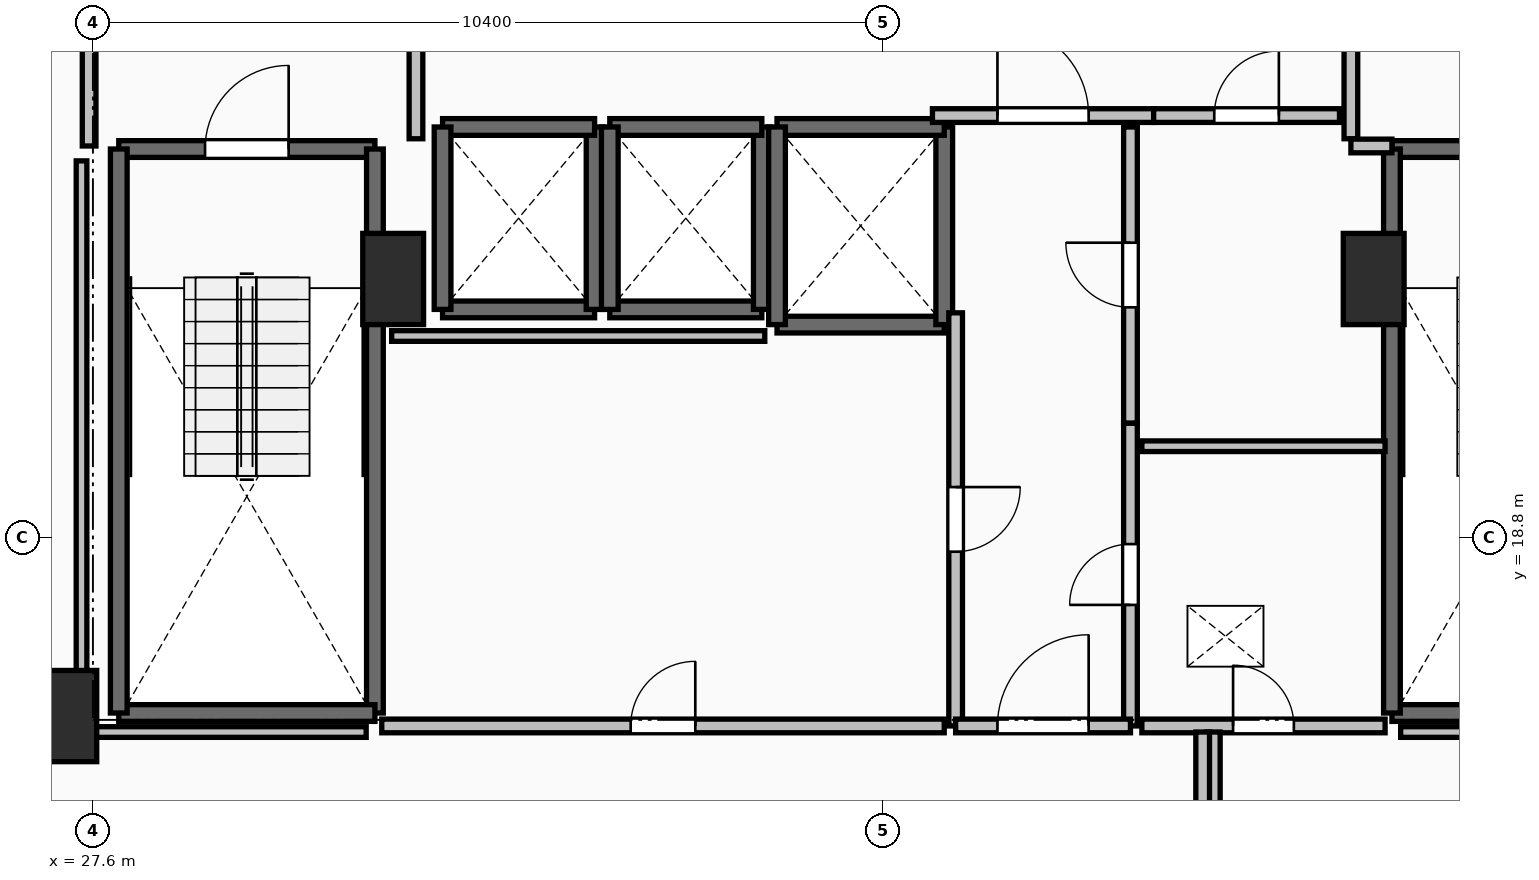
"""IFC4 building model, lengths in metres.
Left out: names, types, materials, properties, quantities, classifications, styles, units other than length and angle.
Written with IfcOpenShell. Run it as: python <this file> out.ifc"""

import sys

from ifc_helpers import new_model, si_unit, direction, frame, frame_2d, origin, origin_2d, place, context, subcontext, project, spatial, rectangle, extrude, element, fill, save


model = new_model("IFC4")
c1 = context("Model", 3, precision=1e-05, world=origin(), true_north=direction((0.0, 1.0)))
c2 = subcontext(c1, "Body", "Model", "MODEL_VIEW")
j1 = project(units=[si_unit("LENGTHUNIT", "METRE"), si_unit("PLANEANGLEUNIT", "RADIAN")], contexts=[c1])
p1 = place(None, origin())
s1 = spatial("IfcSite", under=j1, at=p1, CompositionType="ELEMENT")
p2 = place(p1, origin())
s2 = spatial("IfcBuilding", under=s1, at=p2, CompositionType="ELEMENT")
p3 = place(p2, frame((0.0, 0.0, 62.5)))
s3 = spatial("IfcBuildingStorey", under=s2, at=p3, CompositionType="ELEMENT", Elevation=62.5)
for number, where, z_axis, x_axis in (
    (1, (27.25, 16.45, 0.0), (0.0, 0.0, 1.0), (1.0, 0.0, 0.0)),
    (2, (31.55, 22.2, 0.0), (0.0, 0.0, 1.0), (1.0, 0.0, 0.0)),
    (3, (44.45, 22.2, 0.0), (0.0, 0.0, 1.0), (1.0, 0.0, 0.0)),
):
    element("IfcColumn", number, at=place(p3, frame(where, z_axis=z_axis, x_axis=x_axis)), inside=s3, PredefinedType="PILASTER", context=c2, shape_type="SweptSolid", body=[
        extrude(rectangle(XDim=0.8, YDim=1.2, at=origin_2d()), origin(), (0.0, 0.0, 1.0), 3.5),
    ])
p4 = place(p3, frame((27.94, 23.91, 0.0), z_axis=(0.0, 0.0, 1.0), x_axis=(1.0, 0.0, 0.0)))
e4 = element("IfcWall", 4, at=p4, inside=s3, PredefinedType="SOLIDWALL", context=c2, shape_type="SweptSolid", body=[
    extrude(rectangle(XDim=3.37, YDim=0.22, at=frame_2d((1.685, 0.0))), origin(), (0.0, 0.0, 1.0), 3.24),
])
p5 = place(p4, frame((1.135, 0.0, 0.0)))
e5 = element("IfcOpeningElement", 5, at=p5, cuts=e4, PredefinedType="OPENING", context=c2, shape_type="SweptSolid", body=[
    extrude(rectangle(XDim=1.1, YDim=2.15, at=frame_2d((0.55, 1.075))), frame((0.0, 0.125, 0.0), z_axis=(0.0, -1.0, 0.0), x_axis=(1.0, 0.0, 0.0)), (0.0, 0.0, 1.0), 0.25),
])
p6 = place(p3, frame((31.31, 23.91, 0.0), z_axis=(0.0, 0.0, 1.0), x_axis=(0.0, -1.0, 0.0)))
e6 = element("IfcWall", 6, at=p6, inside=s3, PredefinedType="SOLIDWALL", context=c2, shape_type="SweptSolid", body=[
    extrude(rectangle(XDim=7.42, YDim=0.22, at=frame_2d((3.71, 0.0))), origin(), (0.0, 0.0, 1.0), 3.24),
])
p7 = place(p3, frame((31.31, 16.49, 0.0), z_axis=(0.0, 0.0, 1.0), x_axis=(-1.0, 0.0, 0.0)))
e7 = element("IfcWall", 7, at=p7, inside=s3, PredefinedType="SOLIDWALL", context=c2, shape_type="SweptSolid", body=[
    extrude(rectangle(XDim=3.37, YDim=0.22, at=frame_2d((1.685, 0.0))), origin(), (0.0, 0.0, 1.0), 3.24),
])
p8 = place(p3, frame((27.94, 16.49, 0.0), z_axis=(0.0, 0.0, 1.0), x_axis=(0.0, 1.0, 0.0)))
e8 = element("IfcWall", 8, at=p8, inside=s3, PredefinedType="SOLIDWALL", context=c2, shape_type="SweptSolid", body=[
    extrude(rectangle(XDim=7.42, YDim=0.22, at=frame_2d((3.71, 0.0))), origin(), (0.0, 0.0, 1.0), 3.24),
])
p9 = place(p3, frame((44.69, 23.91, 0.0), z_axis=(0.0, 0.0, 1.0), x_axis=(1.0, 0.0, 0.0)))
e9 = element("IfcWall", 9, at=p9, inside=s3, PredefinedType="SOLIDWALL", context=c2, shape_type="SweptSolid", body=[
    extrude(rectangle(XDim=3.37, YDim=0.22, at=frame_2d((1.685, 0.0))), origin(), (0.0, 0.0, 1.0), 3.24),
])
p10 = place(p9, frame((1.135, 0.0, 0.0)))
e10 = element("IfcOpeningElement", 10, at=p10, cuts=e9, PredefinedType="OPENING", context=c2, shape_type="SweptSolid", body=[
    extrude(rectangle(XDim=1.1, YDim=2.15, at=frame_2d((0.55, 1.075))), frame((0.0, 0.125, 0.0), z_axis=(0.0, -1.0, 0.0), x_axis=(1.0, 0.0, 0.0)), (0.0, 0.0, 1.0), 0.25),
])
p11 = place(p3, frame((48.06, 16.49, 0.0), z_axis=(0.0, 0.0, 1.0), x_axis=(-1.0, 0.0, 0.0)))
e11 = element("IfcWall", 11, at=p11, inside=s3, PredefinedType="SOLIDWALL", context=c2, shape_type="SweptSolid", body=[
    extrude(rectangle(XDim=3.37, YDim=0.22, at=frame_2d((1.685, 0.0))), origin(), (0.0, 0.0, 1.0), 3.24),
])
p12 = place(p3, frame((44.69, 16.49, 0.0), z_axis=(0.0, 0.0, 1.0), x_axis=(0.0, 1.0, 0.0)))
e12 = element("IfcWall", 12, at=p12, inside=s3, PredefinedType="SOLIDWALL", context=c2, shape_type="SweptSolid", body=[
    extrude(rectangle(XDim=7.42, YDim=0.22, at=frame_2d((3.71, 0.0))), origin(), (0.0, 0.0, 1.0), 3.24),
])
p13 = place(p3, frame((32.2, 21.8, 0.0), z_axis=(0.0, 0.0, 1.0), x_axis=(1.0, 0.0, 0.0)))
e13 = element("IfcWall", 13, at=p13, inside=s3, PredefinedType="SOLIDWALL", context=c2, shape_type="SweptSolid", body=[
    extrude(rectangle(XDim=2.0, YDim=0.22, at=frame_2d((1.0, 0.0))), origin(), (0.0, 0.0, 1.0), 3.24),
])
p14 = place(p3, frame((34.2, 21.8, 0.0), z_axis=(0.0, 0.0, 1.0), x_axis=(0.0, 1.0, 0.0)))
e14 = element("IfcWall", 14, at=p14, inside=s3, PredefinedType="SOLIDWALL", context=c2, shape_type="SweptSolid", body=[
    extrude(rectangle(XDim=2.4, YDim=0.22, at=frame_2d((1.2, 0.0))), origin(), (0.0, 0.0, 1.0), 3.24),
])
p15 = place(p3, frame((34.2, 24.2, 0.0), z_axis=(0.0, 0.0, 1.0), x_axis=(-1.0, 0.0, 0.0)))
e15 = element("IfcWall", 15, at=p15, inside=s3, PredefinedType="SOLIDWALL", context=c2, shape_type="SweptSolid", body=[
    extrude(rectangle(XDim=2.0, YDim=0.22, at=frame_2d((1.0, 0.0))), origin(), (0.0, 0.0, 1.0), 3.24),
])
p16 = place(p3, frame((32.2, 24.2, 0.0), z_axis=(0.0, 0.0, 1.0), x_axis=(0.0, -1.0, 0.0)))
e16 = element("IfcWall", 16, at=p16, inside=s3, PredefinedType="SOLIDWALL", context=c2, shape_type="SweptSolid", body=[
    extrude(rectangle(XDim=2.4, YDim=0.22, at=frame_2d((1.2, 0.0))), origin(), (0.0, 0.0, 1.0), 3.24),
])
p17 = place(p3, frame((34.4, 21.8, 0.0), z_axis=(0.0, 0.0, 1.0), x_axis=(1.0, 0.0, 0.0)))
e17 = element("IfcWall", 17, at=p17, inside=s3, PredefinedType="SOLIDWALL", context=c2, shape_type="SweptSolid", body=[
    extrude(rectangle(XDim=2.0, YDim=0.22, at=frame_2d((1.0, 0.0))), origin(), (0.0, 0.0, 1.0), 3.24),
])
p18 = place(p3, frame((36.4, 21.8, 0.0), z_axis=(0.0, 0.0, 1.0), x_axis=(0.0, 1.0, 0.0)))
e18 = element("IfcWall", 18, at=p18, inside=s3, PredefinedType="SOLIDWALL", context=c2, shape_type="SweptSolid", body=[
    extrude(rectangle(XDim=2.4, YDim=0.22, at=frame_2d((1.2, 0.0))), origin(), (0.0, 0.0, 1.0), 3.24),
])
p19 = place(p3, frame((36.4, 24.2, 0.0), z_axis=(0.0, 0.0, 1.0), x_axis=(-1.0, 0.0, 0.0)))
e19 = element("IfcWall", 19, at=p19, inside=s3, PredefinedType="SOLIDWALL", context=c2, shape_type="SweptSolid", body=[
    extrude(rectangle(XDim=2.0, YDim=0.22, at=frame_2d((1.0, 0.0))), origin(), (0.0, 0.0, 1.0), 3.24),
])
p20 = place(p3, frame((34.4, 24.2, 0.0), z_axis=(0.0, 0.0, 1.0), x_axis=(0.0, -1.0, 0.0)))
e20 = element("IfcWall", 20, at=p20, inside=s3, PredefinedType="SOLIDWALL", context=c2, shape_type="SweptSolid", body=[
    extrude(rectangle(XDim=2.4, YDim=0.22, at=frame_2d((1.2, 0.0))), origin(), (0.0, 0.0, 1.0), 3.24),
])
p21 = place(p3, frame((36.6, 21.6, 0.0), z_axis=(0.0, 0.0, 1.0), x_axis=(1.0, 0.0, 0.0)))
e21 = element("IfcWall", 21, at=p21, inside=s3, PredefinedType="SOLIDWALL", context=c2, shape_type="SweptSolid", body=[
    extrude(rectangle(XDim=2.2, YDim=0.22, at=frame_2d((1.1, 0.0))), origin(), (0.0, 0.0, 1.0), 3.24),
])
p22 = place(p3, frame((38.8, 21.6, 0.0), z_axis=(0.0, 0.0, 1.0), x_axis=(0.0, 1.0, 0.0)))
e22 = element("IfcWall", 22, at=p22, inside=s3, PredefinedType="SOLIDWALL", context=c2, shape_type="SweptSolid", body=[
    extrude(rectangle(XDim=2.6, YDim=0.22, at=frame_2d((1.3, 0.0))), origin(), (0.0, 0.0, 1.0), 3.24),
])
p23 = place(p3, frame((38.8, 24.2, 0.0), z_axis=(0.0, 0.0, 1.0), x_axis=(-1.0, 0.0, 0.0)))
e23 = element("IfcWall", 23, at=p23, inside=s3, PredefinedType="SOLIDWALL", context=c2, shape_type="SweptSolid", body=[
    extrude(rectangle(XDim=2.2, YDim=0.22, at=frame_2d((1.1, 0.0))), origin(), (0.0, 0.0, 1.0), 3.24),
])
p24 = place(p3, frame((36.6, 24.2, 0.0), z_axis=(0.0, 0.0, 1.0), x_axis=(0.0, -1.0, 0.0)))
e24 = element("IfcWall", 24, at=p24, inside=s3, PredefinedType="SOLIDWALL", context=c2, shape_type="SweptSolid", body=[
    extrude(rectangle(XDim=2.6, YDim=0.22, at=frame_2d((1.3, 0.0))), origin(), (0.0, 0.0, 1.0), 3.24),
])
p25 = place(p3, frame((31.85, 24.045, 0.0), z_axis=(0.0, 0.0, 1.0), x_axis=(0.0, 1.0, 0.0)))
e25 = element("IfcWall", 25, at=p25, inside=s3, PredefinedType="PARTITIONING", context=c2, shape_type="SweptSolid", body=[
    extrude(rectangle(XDim=3.91, YDim=0.18, at=frame_2d((1.955, 0.0))), origin(), (0.0, 0.0, 1.0), 3.24),
])
p26 = place(p25, frame((1.355, 0.0, 0.0)))
e26 = element("IfcOpeningElement", 26, at=p26, cuts=e25, PredefinedType="OPENING", context=c2, shape_type="SweptSolid", body=[
    extrude(rectangle(XDim=1.2, YDim=2.15, at=frame_2d((0.6, 1.075))), frame((0.0, 0.105, 0.0), z_axis=(0.0, -1.0, 0.0), x_axis=(1.0, 0.0, 0.0)), (0.0, 0.0, 1.0), 0.21),
])
p27 = place(p3, frame((27.55, 28.0, 0.0), z_axis=(0.0, 0.0, 1.0), x_axis=(0.0, -1.0, 0.0)))
e27 = element("IfcWall", 27, at=p27, inside=s3, PredefinedType="PARTITIONING", context=c2, shape_type="SweptSolid", body=[
    extrude(rectangle(XDim=4.05, YDim=0.18, at=frame_2d((2.025, 0.0))), origin(), (0.0, 0.0, 1.0), 3.24),
])
p28 = place(p27, frame((1.425, 0.0, 0.0)))
e28 = element("IfcOpeningElement", 28, at=p28, cuts=e27, PredefinedType="OPENING", context=c2, shape_type="SweptSolid", body=[
    extrude(rectangle(XDim=1.2, YDim=2.15, at=frame_2d((0.6, 1.075))), frame((0.0, 0.105, 0.0), z_axis=(0.0, -1.0, 0.0), x_axis=(1.0, 0.0, 0.0)), (0.0, 0.0, 1.0), 0.21),
])
p29 = place(p3, frame((44.15, 27.955, 0.0), z_axis=(0.0, 0.0, 1.0), x_axis=(0.0, -1.0, 0.0)))
e29 = element("IfcWall", 29, at=p29, inside=s3, PredefinedType="PARTITIONING", context=c2, shape_type="SweptSolid", body=[
    extrude(rectangle(XDim=3.91, YDim=0.18, at=frame_2d((1.955, 0.0))), origin(), (0.0, 0.0, 1.0), 3.24),
])
p30 = place(p29, frame((1.355, 0.0, 0.0)))
e30 = element("IfcOpeningElement", 30, at=p30, cuts=e29, PredefinedType="OPENING", context=c2, shape_type="SweptSolid", body=[
    extrude(rectangle(XDim=1.2, YDim=2.15, at=frame_2d((0.6, 1.075))), frame((0.0, 0.105, 0.0), z_axis=(0.0, -1.0, 0.0), x_axis=(1.0, 0.0, 0.0)), (0.0, 0.0, 1.0), 0.21),
])
p31 = place(p3, frame((44.15, 23.95, 0.0), z_axis=(0.0, 0.0, 1.0), x_axis=(1.0, 0.0, 0.0)))
e31 = element("IfcWall", 31, at=p31, inside=s3, PredefinedType="PARTITIONING", context=c2, shape_type="SweptSolid", body=[
    extrude(rectangle(XDim=0.54, YDim=0.18, at=frame_2d((0.27, 0.0))), origin(), (0.0, 0.0, 1.0), 3.24),
])
p32 = place(p3, frame((38.645, 24.35, 0.0), z_axis=(0.0, 0.0, 1.0), x_axis=(1.0, 0.0, 0.0)))
e32 = element("IfcWall", 32, at=p32, inside=s3, PredefinedType="PARTITIONING", context=c2, shape_type="SweptSolid", body=[
    extrude(rectangle(XDim=2.91, YDim=0.18, at=frame_2d((1.455, 0.0))), origin(), (0.0, 0.0, 1.0), 3.24),
])
p33 = place(p32, frame((0.855, 0.0, 0.0)))
e33 = element("IfcOpeningElement", 33, at=p33, cuts=e32, PredefinedType="OPENING", context=c2, shape_type="SweptSolid", body=[
    extrude(rectangle(XDim=1.2, YDim=2.15, at=frame_2d((0.6, 1.075))), frame((0.0, 0.105, 0.0), z_axis=(0.0, -1.0, 0.0), x_axis=(1.0, 0.0, 0.0)), (0.0, 0.0, 1.0), 0.21),
])
p34 = place(p3, frame((41.555, 24.35, 0.0), z_axis=(0.0, 0.0, 1.0), x_axis=(1.0, 0.0, 0.0)))
e34 = element("IfcWall", 34, at=p34, inside=s3, PredefinedType="PARTITIONING", context=c2, shape_type="SweptSolid", body=[
    extrude(rectangle(XDim=2.445, YDim=0.18, at=frame_2d((1.223, 0.0))), origin(), (0.0, 0.0, 1.0), 3.24),
])
p35 = place(p34, frame((0.798, 0.0, 0.0)))
e35 = element("IfcOpeningElement", 35, at=p35, cuts=e34, PredefinedType="OPENING", context=c2, shape_type="SweptSolid", body=[
    extrude(rectangle(XDim=0.85, YDim=2.1, at=frame_2d((0.425, 1.05))), frame((0.0, 0.105, 0.0), z_axis=(0.0, -1.0, 0.0), x_axis=(1.0, 0.0, 0.0)), (0.0, 0.0, 1.0), 0.21),
])
p36 = place(p3, frame((41.25, 16.32, 0.0), z_axis=(0.0, 0.0, 1.0), x_axis=(0.0, 1.0, 0.0)))
e36 = element("IfcWall", 36, at=p36, inside=s3, PredefinedType="PARTITIONING", context=c2, shape_type="SweptSolid", body=[
    extrude(rectangle(XDim=3.985, YDim=0.18, at=frame_2d((1.992, 0.0))), origin(), (0.0, 0.0, 1.0), 3.24),
])
p37 = place(p36, frame((1.593, 0.0, 0.0)))
e37 = element("IfcOpeningElement", 37, at=p37, cuts=e36, PredefinedType="OPENING", context=c2, shape_type="SweptSolid", body=[
    extrude(rectangle(XDim=0.8, YDim=2.05, at=frame_2d((0.4, 1.025))), frame((0.0, 0.105, 0.0), z_axis=(0.0, -1.0, 0.0), x_axis=(1.0, 0.0, 0.0)), (0.0, 0.0, 1.0), 0.21),
])
p38 = place(p3, frame((41.25, 20.305, 0.0), z_axis=(0.0, 0.0, 1.0), x_axis=(0.0, 1.0, 0.0)))
e38 = element("IfcWall", 38, at=p38, inside=s3, PredefinedType="PARTITIONING", context=c2, shape_type="SweptSolid", body=[
    extrude(rectangle(XDim=3.895, YDim=0.18, at=frame_2d((1.948, 0.0))), origin(), (0.0, 0.0, 1.0), 3.24),
])
p39 = place(p38, frame((1.522, 0.0, 0.0)))
e39 = element("IfcOpeningElement", 39, at=p39, cuts=e38, PredefinedType="OPENING", context=c2, shape_type="SweptSolid", body=[
    extrude(rectangle(XDim=0.85, YDim=2.1, at=frame_2d((0.425, 1.05))), frame((0.0, 0.105, 0.0), z_axis=(0.0, -1.0, 0.0), x_axis=(1.0, 0.0, 0.0)), (0.0, 0.0, 1.0), 0.21),
])
p40 = place(p3, frame((38.95, 21.755, 0.0), z_axis=(0.0, 0.0, 1.0), x_axis=(0.0, -1.0, 0.0)))
e40 = element("IfcWall", 40, at=p40, inside=s3, PredefinedType="PARTITIONING", context=c2, shape_type="SweptSolid", body=[
    extrude(rectangle(XDim=5.435, YDim=0.18, at=frame_2d((2.717, 0.0))), origin(), (0.0, 0.0, 1.0), 3.24),
])
p41 = place(p40, frame((2.292, 0.0, 0.0)))
e41 = element("IfcOpeningElement", 41, at=p41, cuts=e40, PredefinedType="OPENING", context=c2, shape_type="SweptSolid", body=[
    extrude(rectangle(XDim=0.85, YDim=2.1, at=frame_2d((0.425, 1.05))), frame((0.0, 0.105, 0.0), z_axis=(0.0, -1.0, 0.0), x_axis=(1.0, 0.0, 0.0)), (0.0, 0.0, 1.0), 0.21),
])
p42 = place(p3, frame((38.95, 16.32, 0.0), z_axis=(0.0, 0.0, 1.0), x_axis=(1.0, 0.0, 0.0)))
e42 = element("IfcWall", 42, at=p42, inside=s3, PredefinedType="PARTITIONING", context=c2, shape_type="SweptSolid", body=[
    extrude(rectangle(XDim=2.3, YDim=0.18, at=frame_2d((1.15, 0.0))), origin(), (0.0, 0.0, 1.0), 3.24),
])
p43 = place(p42, frame((0.55, 0.0, 0.0)))
e43 = element("IfcOpeningElement", 43, at=p43, cuts=e42, PredefinedType="OPENING", context=c2, shape_type="SweptSolid", body=[
    extrude(rectangle(XDim=1.2, YDim=2.15, at=frame_2d((0.6, 1.075))), frame((0.0, 0.105, 0.0), z_axis=(0.0, -1.0, 0.0), x_axis=(1.0, 0.0, 0.0)), (0.0, 0.0, 1.0), 0.21),
])
p44 = place(p3, frame((44.6, 20.0, 0.0), z_axis=(0.0, 0.0, 1.0), x_axis=(-1.0, 0.0, 0.0)))
e44 = element("IfcWall", 44, at=p44, inside=s3, PredefinedType="PARTITIONING", context=c2, shape_type="SweptSolid", body=[
    extrude(rectangle(XDim=3.2, YDim=0.14, at=frame_2d((1.6, 0.0))), origin(), (0.0, 0.0, 1.0), 3.24),
])
p45 = place(p3, frame((41.4, 16.32, 0.0), z_axis=(0.0, 0.0, 1.0), x_axis=(1.0, 0.0, 0.0)))
e45 = element("IfcWall", 45, at=p45, inside=s3, PredefinedType="PARTITIONING", context=c2, shape_type="SweptSolid", body=[
    extrude(rectangle(XDim=3.2, YDim=0.18, at=frame_2d((1.6, 0.0))), origin(), (0.0, 0.0, 1.0), 3.24),
])
p46 = place(p45, frame((1.2, 0.0, 0.0)))
e46 = element("IfcOpeningElement", 46, at=p46, cuts=e45, PredefinedType="OPENING", context=c2, shape_type="SweptSolid", body=[
    extrude(rectangle(XDim=0.8, YDim=2.05, at=frame_2d((0.4, 1.025))), frame((0.0, 0.105, 0.0), z_axis=(0.0, -1.0, 0.0), x_axis=(1.0, 0.0, 0.0)), (0.0, 0.0, 1.0), 0.21),
])
p47 = place(p3, frame((31.4, 16.32, 0.0), z_axis=(0.0, 0.0, 1.0), x_axis=(1.0, 0.0, 0.0)))
e47 = element("IfcWall", 47, at=p47, inside=s3, PredefinedType="PARTITIONING", context=c2, shape_type="SweptSolid", body=[
    extrude(rectangle(XDim=7.4, YDim=0.18, at=frame_2d((3.7, 0.0))), origin(), (0.0, 0.0, 1.0), 3.24),
])
p48 = place(p47, frame((3.275, 0.0, 0.0)))
e48 = element("IfcOpeningElement", 48, at=p48, cuts=e47, PredefinedType="OPENING", context=c2, shape_type="SweptSolid", body=[
    extrude(rectangle(XDim=0.85, YDim=2.1, at=frame_2d((0.425, 1.05))), frame((0.0, 0.105, 0.0), z_axis=(0.0, -1.0, 0.0), x_axis=(1.0, 0.0, 0.0)), (0.0, 0.0, 1.0), 0.21),
])
for number, where, z_axis, x_axis in (
    (49, (42.34, 16.24, 0.0), (0.0, 0.0, 1.0), (0.0, -1.0, 0.0)),
    (50, (42.2, 14.1, 0.0), (0.0, 0.0, 1.0), (0.0, 1.0, 0.0)),
):
    element("IfcWall", number, at=place(p3, frame(where, z_axis=z_axis, x_axis=x_axis)), inside=s3, PredefinedType="PARTITIONING", context=c2, shape_type="SweptSolid", body=[
        extrude(rectangle(XDim=2.14, YDim=0.18, at=frame_2d((1.07, 0.0))), origin(), (0.0, 0.0, 1.0), 3.24),
    ])
p49 = place(p3, frame((36.439, 21.45, 0.0), z_axis=(0.0, 0.0, 1.0), x_axis=(-1.0, 0.0, 0.0)))
e51 = element("IfcWall", 51, at=p49, inside=s3, PredefinedType="PARTITIONING", context=c2, shape_type="SweptSolid", body=[
    extrude(rectangle(XDim=4.909, YDim=0.14, at=frame_2d((2.455, 0.0))), origin(), (0.0, 0.0, 1.0), 3.24),
])
for number, where, z_axis, x_axis in (
    (52, (48.55, 16.24, 0.0), (0.0, 0.0, 1.0), (-1.0, 0.0, 0.0)),
    (53, (31.195, 16.24, 0.0), (0.0, 0.0, 1.0), (-1.0, 0.0, 0.0)),
):
    element("IfcWall", number, at=place(p3, frame(where, z_axis=z_axis, x_axis=x_axis)), inside=s3, PredefinedType="PARTITIONING", context=c2, shape_type="SweptSolid", body=[
        extrude(rectangle(XDim=3.745, YDim=0.14, at=frame_2d((1.873, 0.0))), origin(), (0.0, 0.0, 1.0), 2.432),
    ])
p50 = place(p3, frame((27.45, 16.24, 0.0), z_axis=(0.0, 0.0, 1.0), x_axis=(0.0, 1.0, 0.0)))
e54 = element("IfcWall", 54, at=p50, inside=s3, PredefinedType="PARTITIONING", context=c2, shape_type="SweptSolid", body=[
    extrude(rectangle(XDim=7.514, YDim=0.14, at=frame_2d((3.757, 0.0))), origin(), (0.0, 0.0, 1.0), 2.432),
])
p51 = place(p5, origin())
e55 = element("IfcDoor", 55, at=p51, inside=s3, OperationType="SINGLE_SWING_RIGHT", PredefinedType="DOOR", context=c2, shape_type="SweptSolid", body=[
    extrude(rectangle(XDim=1.1, YDim=2.15, at=frame_2d((0.55, 1.075))), frame((0.0, 0.025, 0.0), z_axis=(0.0, -1.0, 0.0), x_axis=(1.0, 0.0, 0.0)), (0.0, 0.0, 1.0), 0.05),
])
fill(e5, e55)
p52 = place(p33, origin())
e56 = element("IfcDoor", 56, at=p52, inside=s3, OperationType="SINGLE_SWING_LEFT", PredefinedType="DOOR", context=c2, shape_type="SweptSolid", body=[
    extrude(rectangle(XDim=1.2, YDim=2.15, at=frame_2d((0.6, 1.075))), frame((0.0, 0.025, 0.0), z_axis=(0.0, -1.0, 0.0), x_axis=(1.0, 0.0, 0.0)), (0.0, 0.0, 1.0), 0.05),
])
fill(e33, e56)
p53 = place(p35, origin())
e57 = element("IfcDoor", 57, at=p53, inside=s3, OperationType="SINGLE_SWING_RIGHT", PredefinedType="DOOR", context=c2, shape_type="SweptSolid", body=[
    extrude(rectangle(XDim=0.85, YDim=2.1, at=frame_2d((0.425, 1.05))), frame((0.0, 0.025, 0.0), z_axis=(0.0, -1.0, 0.0), x_axis=(1.0, 0.0, 0.0)), (0.0, 0.0, 1.0), 0.05),
])
fill(e35, e57)
p54 = place(p37, origin())
e58 = element("IfcDoor", 58, at=p54, inside=s3, OperationType="SINGLE_SWING_LEFT", PredefinedType="DOOR", context=c2, shape_type="SweptSolid", body=[
    extrude(rectangle(XDim=0.8, YDim=2.05, at=frame_2d((0.4, 1.025))), frame((0.0, 0.025, 0.0), z_axis=(0.0, -1.0, 0.0), x_axis=(1.0, 0.0, 0.0)), (0.0, 0.0, 1.0), 0.05),
])
fill(e37, e58)
p55 = place(p39, origin())
e59 = element("IfcDoor", 59, at=p55, inside=s3, OperationType="SINGLE_SWING_RIGHT", PredefinedType="DOOR", context=c2, shape_type="SweptSolid", body=[
    extrude(rectangle(XDim=0.85, YDim=2.1, at=frame_2d((0.425, 1.05))), frame((0.0, 0.025, 0.0), z_axis=(0.0, -1.0, 0.0), x_axis=(1.0, 0.0, 0.0)), (0.0, 0.0, 1.0), 0.05),
])
fill(e39, e59)
p56 = place(p41, origin())
e60 = element("IfcDoor", 60, at=p56, inside=s3, OperationType="SINGLE_SWING_LEFT", PredefinedType="DOOR", context=c2, shape_type="SweptSolid", body=[
    extrude(rectangle(XDim=0.85, YDim=2.1, at=frame_2d((0.425, 1.05))), frame((0.0, 0.025, 0.0), z_axis=(0.0, -1.0, 0.0), x_axis=(1.0, 0.0, 0.0)), (0.0, 0.0, 1.0), 0.05),
])
fill(e41, e60)
p57 = place(p43, origin())
e61 = element("IfcDoor", 61, at=p57, inside=s3, OperationType="SINGLE_SWING_RIGHT", PredefinedType="DOOR", context=c2, shape_type="SweptSolid", body=[
    extrude(rectangle(XDim=1.2, YDim=2.15, at=frame_2d((0.6, 1.075))), frame((0.0, 0.025, 0.0), z_axis=(0.0, -1.0, 0.0), x_axis=(1.0, 0.0, 0.0)), (0.0, 0.0, 1.0), 0.05),
])
fill(e43, e61)
p58 = place(p46, origin())
e62 = element("IfcDoor", 62, at=p58, inside=s3, OperationType="SINGLE_SWING_LEFT", PredefinedType="DOOR", context=c2, shape_type="SweptSolid", body=[
    extrude(rectangle(XDim=0.8, YDim=2.05, at=frame_2d((0.4, 1.025))), frame((0.0, 0.025, 0.0), z_axis=(0.0, -1.0, 0.0), x_axis=(1.0, 0.0, 0.0)), (0.0, 0.0, 1.0), 0.05),
])
fill(e46, e62)
p59 = place(p48, origin())
e63 = element("IfcDoor", 63, at=p59, inside=s3, OperationType="SINGLE_SWING_RIGHT", PredefinedType="DOOR", context=c2, shape_type="SweptSolid", body=[
    extrude(rectangle(XDim=0.85, YDim=2.1, at=frame_2d((0.425, 1.05))), frame((0.0, 0.025, 0.0), z_axis=(0.0, -1.0, 0.0), x_axis=(1.0, 0.0, 0.0)), (0.0, 0.0, 1.0), 0.05),
])
fill(e48, e63)
save(model, sys.argv[1])
